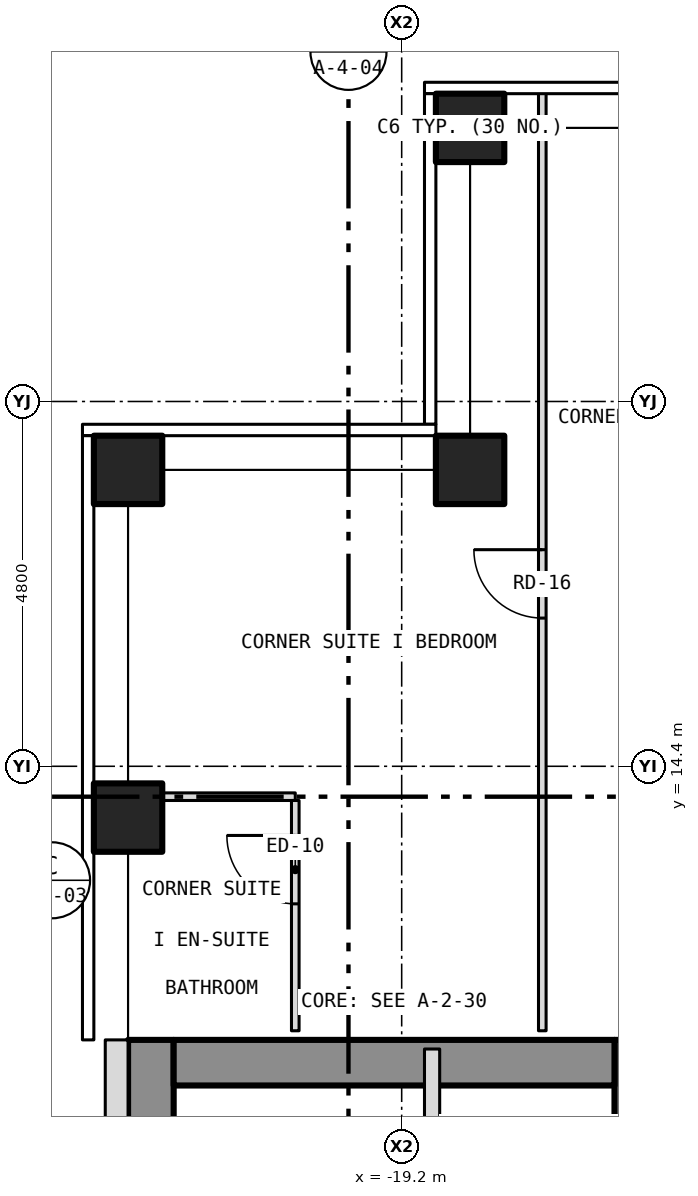
"""IFC4 building model, lengths in metres.
Left out: names, types, materials, properties, quantities, classifications, styles, units other than length and angle.
Written with IfcOpenShell. Run it as: python <this file> out.ifc"""

import sys

from ifc_helpers import new_model, si_unit, direction, frame, frame_2d, origin, origin_2d, place, context, subcontext, project, spatial, rectangle, hollow_rectangle, extrude, element, fill, save


model = new_model("IFC4")
c1 = context("Model", 3, precision=1e-05, world=origin(), true_north=direction((0.0, 1.0)))
c2 = subcontext(c1, "Body", "Model", "MODEL_VIEW")
j1 = project(units=[si_unit("LENGTHUNIT", "METRE"), si_unit("PLANEANGLEUNIT", "RADIAN")], contexts=[c1])
p1 = place(None, origin())
s1 = spatial("IfcSite", under=j1, at=p1, CompositionType="ELEMENT")
p2 = place(p1, origin())
s2 = spatial("IfcBuilding", under=s1, at=p2, CompositionType="ELEMENT")
p3 = place(p2, frame((0.0, 0.0, 110.0)))
s3 = spatial("IfcBuildingStorey", under=s2, at=p3, CompositionType="ELEMENT", Elevation=110.0)
for number, where, z_axis, x_axis in (
    (1, (-18.3, 22.8, -0.15), (0.0, 0.0, 1.0), (1.0, 0.0, 0.0)),
    (2, (-22.8, 13.725, -0.15), (0.0, 0.0, 1.0), (1.0, 0.0, 0.0)),
    (3, (-22.8, 18.3, -0.15), (0.0, 0.0, 1.0), (1.0, 0.0, 0.0)),
    (4, (-18.3, 18.3, -0.15), (0.0, 0.0, 1.0), (1.0, 0.0, 0.0)),
):
    element("IfcColumn", number, at=place(p3, frame(where, z_axis=z_axis, x_axis=x_axis)), inside=s3, PredefinedType="COLUMN", context=c2, shape_type="SweptSolid", body=[
        extrude(hollow_rectangle(XDim=0.9, YDim=0.9, WallThickness=0.05, at=origin_2d()), origin(), (0.0, 0.0, 1.0), 3.5),
    ])
p4 = place(p3, frame((-16.1, -10.8, 0.0), z_axis=(0.0, 0.0, 1.0), x_axis=(0.0, 1.0, 0.0)))
e5 = element("IfcWall", 5, at=p4, inside=s3, PredefinedType="SHEAR", context=c2, shape_type="SweptSolid", body=[
    extrude(rectangle(XDim=21.6, YDim=0.6, at=frame_2d((10.8, 0.0))), origin(), (0.0, 0.0, 1.0), 3.25),
])
p5 = place(p4, frame((9.4, 0.0, 0.0)))
e6 = element("IfcOpeningElement", 6, at=p5, cuts=e5, PredefinedType="OPENING", context=c2, shape_type="SweptSolid", body=[
    extrude(rectangle(XDim=1.1, YDim=2.1, at=frame_2d((0.55, 1.05))), frame((0.0, 0.312, 0.0), z_axis=(0.0, -1.0, 0.0), x_axis=(1.0, 0.0, 0.0)), (0.0, 0.0, 1.0), 0.624),
])
p6 = place(p4, frame((11.5, 0.0, 0.0)))
e7 = element("IfcOpeningElement", 7, at=p6, cuts=e5, PredefinedType="OPENING", context=c2, shape_type="SweptSolid", body=[
    extrude(rectangle(XDim=1.1, YDim=2.1, at=frame_2d((0.55, 1.05))), frame((0.0, 0.312, 0.0), z_axis=(0.0, -1.0, 0.0), x_axis=(1.0, 0.0, 0.0)), (0.0, 0.0, 1.0), 0.624),
])
p7 = place(p4, frame((13.6, 0.0, 0.0)))
e8 = element("IfcOpeningElement", 8, at=p7, cuts=e5, PredefinedType="OPENING", context=c2, shape_type="SweptSolid", body=[
    extrude(rectangle(XDim=1.1, YDim=2.1, at=frame_2d((0.55, 1.05))), frame((0.0, 0.312, 0.0), z_axis=(0.0, -1.0, 0.0), x_axis=(1.0, 0.0, 0.0)), (0.0, 0.0, 1.0), 0.624),
])
p8 = place(p4, frame((15.7, 0.0, 0.0)))
e9 = element("IfcOpeningElement", 9, at=p8, cuts=e5, PredefinedType="OPENING", context=c2, shape_type="SweptSolid", body=[
    extrude(rectangle(XDim=1.1, YDim=2.1, at=frame_2d((0.55, 1.05))), frame((0.0, 0.312, 0.0), z_axis=(0.0, -1.0, 0.0), x_axis=(1.0, 0.0, 0.0)), (0.0, 0.0, 1.0), 0.624),
])
p9 = place(p4, frame((17.8, 0.0, 0.0)))
e10 = element("IfcOpeningElement", 10, at=p9, cuts=e5, PredefinedType="OPENING", context=c2, shape_type="SweptSolid", body=[
    extrude(rectangle(XDim=1.1, YDim=2.1, at=frame_2d((0.55, 1.05))), frame((0.0, 0.312, 0.0), z_axis=(0.0, -1.0, 0.0), x_axis=(1.0, 0.0, 0.0)), (0.0, 0.0, 1.0), 0.624),
])
p10 = place(p4, frame((0.758, 0.0, 0.0)))
e11 = element("IfcOpeningElement", 11, at=p10, cuts=e5, PredefinedType="OPENING", context=c2, shape_type="SweptSolid", body=[
    extrude(rectangle(XDim=1.1, YDim=2.1, at=frame_2d((0.55, 1.05))), frame((0.0, 0.312, 0.0), z_axis=(0.0, -1.0, 0.0), x_axis=(1.0, 0.0, 0.0)), (0.0, 0.0, 1.0), 0.624),
])
p11 = place(p4, frame((7.5, 0.0, 0.0)))
e12 = element("IfcOpeningElement", 12, at=p11, cuts=e5, PredefinedType="OPENING", context=c2, shape_type="SweptSolid", body=[
    extrude(rectangle(XDim=1.1, YDim=2.1, at=frame_2d((0.55, 1.05))), frame((0.0, 0.312, 0.0), z_axis=(0.0, -1.0, 0.0), x_axis=(1.0, 0.0, 0.0)), (0.0, 0.0, 1.0), 0.624),
])
p12 = place(p3, frame((-22.5, -10.8, 0.0), z_axis=(0.0, 0.0, 1.0), x_axis=(0.0, 1.0, 0.0)))
e13 = element("IfcWall", 13, at=p12, inside=s3, PredefinedType="SHEAR", context=c2, shape_type="SweptSolid", body=[
    extrude(rectangle(XDim=21.6, YDim=0.6, at=frame_2d((10.8, 0.0))), origin(), (0.0, 0.0, 1.0), 3.25),
])
p13 = place(p3, frame((-22.2, 10.5, 0.0), z_axis=(0.0, 0.0, 1.0), x_axis=(1.0, 0.0, 0.0)))
e14 = element("IfcWall", 14, at=p13, inside=s3, PredefinedType="SHEAR", context=c2, shape_type="SweptSolid", body=[
    extrude(rectangle(XDim=5.8, YDim=0.6, at=frame_2d((2.9, 0.0))), origin(), (0.0, 0.0, 1.0), 3.25),
])
p14 = place(p3, frame((-22.95, 10.8, 0.0), z_axis=(0.0, 0.0, 1.0), x_axis=(0.0, -1.0, 0.0)))
e15 = element("IfcWall", 15, at=p14, inside=s3, PredefinedType="SOLIDWALL", context=c2, shape_type="SweptSolid", body=[
    extrude(rectangle(XDim=21.6, YDim=0.3, at=frame_2d((10.8, 0.0))), origin(), (0.0, 0.0, 1.0), 3.5),
])
p15 = place(p14, frame((18.05, 0.0, 1.0)))
e16 = element("IfcOpeningElement", 16, at=p15, cuts=e15, PredefinedType="OPENING", context=c2, shape_type="SweptSolid", body=[
    extrude(rectangle(XDim=0.6, YDim=1.5, at=frame_2d((0.3, 0.75))), frame((0.0, 0.162, 0.0), z_axis=(0.0, -1.0, 0.0), x_axis=(1.0, 0.0, 0.0)), (0.0, 0.0, 1.0), 0.324),
])
p16 = place(p3, frame((-22.68, 14.0, 0.0), z_axis=(0.0, 0.0, 1.0), x_axis=(1.0, 0.0, 0.0)))
e17 = element("IfcWall", 17, at=p16, inside=s3, PredefinedType="PARTITIONING", context=c2, shape_type="SweptSolid", body=[
    extrude(rectangle(XDim=2.08, YDim=0.1, at=frame_2d((1.04, 0.0))), origin(), (0.0, 0.0, 1.0), 3.35),
])
p17 = place(p3, frame((-20.6, 10.92, 0.0), z_axis=(0.0, 0.0, 1.0), x_axis=(0.0, 1.0, 0.0)))
e18 = element("IfcWall", 18, at=p17, inside=s3, PredefinedType="PARTITIONING", context=c2, shape_type="SweptSolid", body=[
    extrude(rectangle(XDim=3.03, YDim=0.1, at=frame_2d((1.515, 0.0))), origin(), (0.0, 0.0, 1.0), 3.35),
])
p18 = place(p17, frame((1.67, 0.0, 0.0)))
e19 = element("IfcOpeningElement", 19, at=p18, cuts=e18, PredefinedType="OPENING", context=c2, shape_type="SweptSolid", body=[
    extrude(rectangle(XDim=0.9, YDim=2.1, at=frame_2d((0.45, 1.05))), frame((0.0, 0.062, 0.0), z_axis=(0.0, -1.0, 0.0), x_axis=(1.0, 0.0, 0.0)), (0.0, 0.0, 1.0), 0.124),
])
p19 = place(p3, frame((-18.8, -1.8, 0.0), z_axis=(0.0, 0.0, 1.0), x_axis=(0.0, 1.0, 0.0)))
e20 = element("IfcWall", 20, at=p19, inside=s3, PredefinedType="PARTITIONING", context=c2, shape_type="SweptSolid", body=[
    extrude(rectangle(XDim=12.48, YDim=0.2, at=frame_2d((6.24, 0.0))), origin(), (0.0, 0.0, 1.0), 3.25),
])
p20 = place(p3, frame((-17.35, 10.92, 0.0), z_axis=(0.0, 0.0, 1.0), x_axis=(0.0, 1.0, 0.0)))
e21 = element("IfcWall", 21, at=p20, inside=s3, PredefinedType="PARTITIONING", context=c2, shape_type="SweptSolid", body=[
    extrude(rectangle(XDim=12.36, YDim=0.1, at=frame_2d((6.18, 0.0))), origin(), (0.0, 0.0, 1.0), 3.35),
])
p21 = place(p20, frame((5.43, 0.0, 0.0)))
e22 = element("IfcOpeningElement", 22, at=p21, cuts=e21, PredefinedType="OPENING", context=c2, shape_type="SweptSolid", body=[
    extrude(rectangle(XDim=0.9, YDim=2.1, at=frame_2d((0.45, 1.05))), frame((0.0, 0.062, 0.0), z_axis=(0.0, -1.0, 0.0), x_axis=(1.0, 0.0, 0.0)), (0.0, 0.0, 1.0), 0.124),
])
p22 = place(p21, origin())
e23 = element("IfcDoor", 23, at=p22, inside=s3, OperationType="SINGLE_SWING_RIGHT", PredefinedType="DOOR", context=c2, shape_type="SweptSolid", body=[
    extrude(rectangle(XDim=0.9, YDim=2.1, at=frame_2d((0.45, 1.05))), frame((0.0, 0.025, 0.0), z_axis=(0.0, -1.0, 0.0), x_axis=(1.0, 0.0, 0.0)), (0.0, 0.0, 1.0), 0.05),
])
fill(e22, e23)
p23 = place(p18, origin())
e24 = element("IfcDoor", 24, at=p23, inside=s3, OperationType="SINGLE_SWING_RIGHT", PredefinedType="DOOR", context=c2, shape_type="SweptSolid", body=[
    extrude(rectangle(XDim=0.9, YDim=2.1, at=frame_2d((0.45, 1.05))), frame((0.0, 0.025, 0.0), z_axis=(0.0, -1.0, 0.0), x_axis=(1.0, 0.0, 0.0)), (0.0, 0.0, 1.0), 0.05),
])
fill(e19, e24)
save(model, sys.argv[1])
